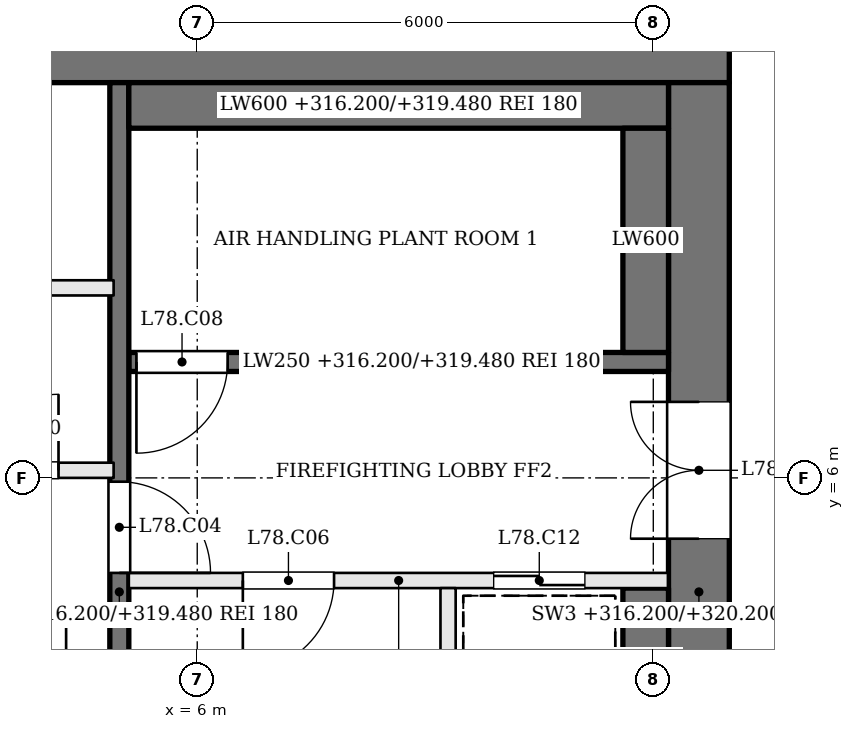
"""IFC4 building model, lengths in metres.
Left out: names, types, materials, properties, quantities, classifications, styles, units other than length and angle.
Written with IfcOpenShell. Run it as: python <this file> out.ifc"""

import sys

from ifc_helpers import new_model, si_unit, direction, frame, frame_2d, origin, place, context, subcontext, project, spatial, rectangle, extrude, element, fill, save


model = new_model("IFC4")
c1 = context("Model", 3, precision=1e-05, world=origin(), true_north=direction((0.0, 1.0)))
c2 = subcontext(c1, "Body", "Model", "MODEL_VIEW")
j1 = project(units=[si_unit("LENGTHUNIT", "METRE"), si_unit("PLANEANGLEUNIT", "RADIAN")], contexts=[c1])
p1 = place(None, origin())
s1 = spatial("IfcSite", under=j1, at=p1, CompositionType="ELEMENT")
p2 = place(p1, origin())
s2 = spatial("IfcBuilding", under=s1, at=p2, CompositionType="ELEMENT")
p3 = place(p2, frame((0.0, 0.0, 316.2)))
s3 = spatial("IfcBuildingStorey", under=s2, at=p3, CompositionType="ELEMENT", Elevation=316.2)
p4 = place(p3, frame((-13.0, 11.6, 0.0), z_axis=(0.0, 0.0, 1.0), x_axis=(1.0, 0.0, 0.0)))
e1 = element("IfcWall", 1, at=p4, inside=s3, PredefinedType="SHEAR", context=c2, shape_type="SweptSolid", body=[
    extrude(rectangle(XDim=26.0, YDim=0.8, at=frame_2d((13.0, 0.0))), origin(), (0.0, 0.0, 1.0), 4.0),
])
p5 = place(p4, frame((9.375, 0.0, 0.0)))
e2 = element("IfcOpeningElement", 2, at=p5, cuts=e1, PredefinedType="OPENING", context=c2, shape_type="SweptSolid", body=[
    extrude(rectangle(XDim=0.7, YDim=2.1, at=frame_2d((0.35, 1.05))), frame((0.0, 0.41, 0.0), z_axis=(0.0, -1.0, 0.0), x_axis=(1.0, 0.0, 0.0)), (0.0, 0.0, 1.0), 0.82),
])
p6 = place(p4, frame((12.375, 0.0, 0.0)))
e3 = element("IfcOpeningElement", 3, at=p6, cuts=e1, PredefinedType="OPENING", context=c2, shape_type="SweptSolid", body=[
    extrude(rectangle(XDim=1.2, YDim=2.1, at=frame_2d((0.6, 1.05))), frame((0.0, 0.41, 0.0), z_axis=(0.0, -1.0, 0.0), x_axis=(1.0, 0.0, 0.0)), (0.0, 0.0, 1.0), 0.82),
])
p7 = place(p4, frame((15.9, 0.0, 0.0)))
e4 = element("IfcOpeningElement", 4, at=p7, cuts=e1, PredefinedType="OPENING", context=c2, shape_type="SweptSolid", body=[
    extrude(rectangle(XDim=0.7, YDim=2.1, at=frame_2d((0.35, 1.05))), frame((0.0, 0.41, 0.0), z_axis=(0.0, -1.0, 0.0), x_axis=(1.0, 0.0, 0.0)), (0.0, 0.0, 1.0), 0.82),
])
p8 = place(p4, frame((6.7, 0.0, 0.0)))
e5 = element("IfcOpeningElement", 5, at=p8, cuts=e1, PredefinedType="OPENING", context=c2, shape_type="SweptSolid", body=[
    extrude(rectangle(XDim=0.9, YDim=2.1, at=frame_2d((0.45, 1.05))), frame((0.0, 0.41, 0.0), z_axis=(0.0, -1.0, 0.0), x_axis=(1.0, 0.0, 0.0)), (0.0, 0.0, 1.0), 0.82),
])
p9 = place(p3, frame((12.6, -2.2, 0.0), z_axis=(0.0, 0.0, 1.0), x_axis=(0.0, 1.0, 0.0)))
e6 = element("IfcWall", 6, at=p9, inside=s3, PredefinedType="SHEAR", context=c2, shape_type="SweptSolid", body=[
    extrude(rectangle(XDim=13.4, YDim=0.8, at=frame_2d((6.7, 0.0))), origin(), (0.0, 0.0, 1.0), 4.0),
])
p10 = place(p9, frame((7.4, 0.0, 0.0)))
e7 = element("IfcOpeningElement", 7, at=p10, cuts=e6, PredefinedType="OPENING", context=c2, shape_type="SweptSolid", body=[
    extrude(rectangle(XDim=1.8, YDim=2.1, at=frame_2d((0.9, 1.05))), frame((0.0, 0.41, 0.0), z_axis=(0.0, -1.0, 0.0), x_axis=(1.0, 0.0, 0.0)), (0.0, 0.0, 1.0), 0.82),
])
p11 = place(p3, frame((12.2, 7.525, 0.0), z_axis=(0.0, 0.0, 1.0), x_axis=(-1.0, 0.0, 0.0)))
e8 = element("IfcWall", 8, at=p11, inside=s3, PredefinedType="SOLIDWALL", context=c2, shape_type="SweptSolid", body=[
    extrude(rectangle(XDim=7.1, YDim=0.25, at=frame_2d((3.55, 0.0))), origin(), (0.0, 0.0, 1.0), 3.28),
])
p12 = place(p11, frame((5.8, 0.0, 0.0)))
e9 = element("IfcOpeningElement", 9, at=p12, cuts=e8, PredefinedType="OPENING", context=c2, shape_type="SweptSolid", body=[
    extrude(rectangle(XDim=1.2, YDim=2.1, at=frame_2d((0.6, 1.05))), frame((0.0, 0.135, 0.0), z_axis=(0.0, -1.0, 0.0), x_axis=(1.0, 0.0, 0.0)), (0.0, 0.0, 1.0), 0.27),
])
p13 = place(p3, frame((12.2, 4.65, 0.0), z_axis=(0.0, 0.0, 1.0), x_axis=(-1.0, 0.0, 0.0)))
e10 = element("IfcWall", 10, at=p13, inside=s3, PredefinedType="SOLIDWALL", context=c2, shape_type="SweptSolid", body=[
    extrude(rectangle(XDim=7.1, YDim=0.2, at=frame_2d((3.55, 0.0))), origin(), (0.0, 0.0, 1.0), 3.28),
])
p14 = place(p13, frame((4.4, 0.0, 0.0)))
e11 = element("IfcOpeningElement", 11, at=p14, cuts=e10, PredefinedType="OPENING", context=c2, shape_type="SweptSolid", body=[
    extrude(rectangle(XDim=1.2, YDim=2.1, at=frame_2d((0.6, 1.05))), frame((0.0, 0.11, 0.0), z_axis=(0.0, -1.0, 0.0), x_axis=(1.0, 0.0, 0.0)), (0.0, 0.0, 1.0), 0.22),
])
p15 = place(p13, frame((1.1, 0.0, 0.0)))
e12 = element("IfcOpeningElement", 12, at=p15, cuts=e10, PredefinedType="OPENING", context=c2, shape_type="SweptSolid", body=[
    extrude(rectangle(XDim=1.2, YDim=2.1, at=frame_2d((0.6, 1.05))), frame((0.0, 0.11, 0.0), z_axis=(0.0, -1.0, 0.0), x_axis=(1.0, 0.0, 0.0)), (0.0, 0.0, 1.0), 0.22),
])
p16 = place(p3, frame((9.3, 4.55, 0.0), z_axis=(0.0, 0.0, 1.0), x_axis=(0.0, -1.0, 0.0)))
e13 = element("IfcWall", 13, at=p16, inside=s3, PredefinedType="SOLIDWALL", context=c2, shape_type="SweptSolid", body=[
    extrude(rectangle(XDim=3.0, YDim=0.2, at=frame_2d((1.5, 0.0))), origin(), (0.0, 0.0, 1.0), 3.28),
])
p17 = place(p3, frame((4.975, 11.2, 0.0), z_axis=(0.0, 0.0, 1.0), x_axis=(0.0, -1.0, 0.0)))
e14 = element("IfcWall", 14, at=p17, inside=s3, PredefinedType="SOLIDWALL", context=c2, shape_type="SweptSolid", body=[
    extrude(rectangle(XDim=13.4, YDim=0.25, at=frame_2d((6.7, 0.0))), origin(), (0.0, 0.0, 1.0), 3.28),
])
p18 = place(p17, frame((5.25, 0.0, 0.0)))
e15 = element("IfcOpeningElement", 15, at=p18, cuts=e14, PredefinedType="OPENING", context=c2, shape_type="SweptSolid", body=[
    extrude(rectangle(XDim=1.2, YDim=2.1, at=frame_2d((0.6, 1.05))), frame((0.0, 0.135, 0.0), z_axis=(0.0, -1.0, 0.0), x_axis=(1.0, 0.0, 0.0)), (0.0, 0.0, 1.0), 0.27),
])
p19 = place(p3, frame((12.2, 10.9, 0.0), z_axis=(0.0, 0.0, 1.0), x_axis=(-1.0, 0.0, 0.0)))
e16 = element("IfcWall", 16, at=p19, inside=s3, PredefinedType="SOLIDWALL", context=c2, shape_type="SweptSolid", body=[
    extrude(rectangle(XDim=7.1, YDim=0.6, at=frame_2d((3.55, 0.0))), origin(), (0.0, 0.0, 1.0), 3.28),
])
p20 = place(p3, frame((11.9, 10.6, 0.0), z_axis=(0.0, 0.0, 1.0), x_axis=(0.0, -1.0, 0.0)))
e17 = element("IfcWall", 17, at=p20, inside=s3, PredefinedType="SOLIDWALL", context=c2, shape_type="SweptSolid", body=[
    extrude(rectangle(XDim=2.95, YDim=0.6, at=frame_2d((1.475, 0.0))), origin(), (0.0, 0.0, 1.0), 3.28),
])
p21 = place(p3, frame((11.9, 4.55, 0.0), z_axis=(0.0, 0.0, 1.0), x_axis=(0.0, -1.0, 0.0)))
e18 = element("IfcWall", 18, at=p21, inside=s3, PredefinedType="SOLIDWALL", context=c2, shape_type="SweptSolid", body=[
    extrude(rectangle(XDim=3.0, YDim=0.6, at=frame_2d((1.5, 0.0))), origin(), (0.0, 0.0, 1.0), 3.28),
])
p22 = place(p3, frame((-4.9, 6.1, 0.0), z_axis=(0.0, 0.0, 1.0), x_axis=(1.0, 0.0, 0.0)))
e19 = element("IfcWall", 19, at=p22, inside=s3, PredefinedType="SOLIDWALL", context=c2, shape_type="SweptSolid", body=[
    extrude(rectangle(XDim=9.8, YDim=0.2, at=frame_2d((4.9, 0.0))), origin(), (0.0, 0.0, 1.0), 3.28),
])
p23 = place(p22, frame((0.725, 0.0, 0.0)))
e20 = element("IfcOpeningElement", 20, at=p23, cuts=e19, PredefinedType="OPENING", context=c2, shape_type="SweptSolid", body=[
    extrude(rectangle(XDim=1.0, YDim=2.1, at=frame_2d((0.5, 1.05))), frame((0.0, 0.11, 0.0), z_axis=(0.0, -1.0, 0.0), x_axis=(1.0, 0.0, 0.0)), (0.0, 0.0, 1.0), 0.22),
])
p24 = place(p22, frame((3.175, 0.0, 0.0)))
e21 = element("IfcOpeningElement", 21, at=p24, cuts=e19, PredefinedType="OPENING", context=c2, shape_type="SweptSolid", body=[
    extrude(rectangle(XDim=1.0, YDim=2.1, at=frame_2d((0.5, 1.05))), frame((0.0, 0.11, 0.0), z_axis=(0.0, -1.0, 0.0), x_axis=(1.0, 0.0, 0.0)), (0.0, 0.0, 1.0), 0.22),
])
p25 = place(p22, frame((5.625, 0.0, 0.0)))
e22 = element("IfcOpeningElement", 22, at=p25, cuts=e19, PredefinedType="OPENING", context=c2, shape_type="SweptSolid", body=[
    extrude(rectangle(XDim=1.0, YDim=2.1, at=frame_2d((0.5, 1.05))), frame((0.0, 0.11, 0.0), z_axis=(0.0, -1.0, 0.0), x_axis=(1.0, 0.0, 0.0)), (0.0, 0.0, 1.0), 0.22),
])
p26 = place(p22, frame((8.075, 0.0, 0.0)))
e23 = element("IfcOpeningElement", 23, at=p26, cuts=e19, PredefinedType="OPENING", context=c2, shape_type="SweptSolid", body=[
    extrude(rectangle(XDim=1.0, YDim=2.1, at=frame_2d((0.5, 1.05))), frame((0.0, 0.11, 0.0), z_axis=(0.0, -1.0, 0.0), x_axis=(1.0, 0.0, 0.0)), (0.0, 0.0, 1.0), 0.22),
])
p27 = place(p3, frame((-4.9, 8.5, 0.0), z_axis=(0.0, 0.0, 1.0), x_axis=(1.0, 0.0, 0.0)))
e24 = element("IfcWall", 24, at=p27, inside=s3, PredefinedType="SOLIDWALL", context=c2, shape_type="SweptSolid", body=[
    extrude(rectangle(XDim=9.8, YDim=0.2, at=frame_2d((4.9, 0.0))), origin(), (0.0, 0.0, 1.0), 3.28),
])
p28 = place(p10, origin())
e25 = element("IfcDoor", 25, at=p28, inside=s3, OperationType="DOUBLE_DOOR_SINGLE_SWING", PredefinedType="DOOR", context=c2, shape_type="SweptSolid", body=[
    extrude(rectangle(XDim=1.8, YDim=2.1, at=frame_2d((0.9, 1.05))), frame((0.0, 0.025, 0.0), z_axis=(0.0, -1.0, 0.0), x_axis=(1.0, 0.0, 0.0)), (0.0, 0.0, 1.0), 0.05),
])
fill(e7, e25)
p29 = place(p18, origin())
e26 = element("IfcDoor", 26, at=p29, inside=s3, OperationType="SINGLE_SWING_RIGHT", PredefinedType="DOOR", context=c2, shape_type="SweptSolid", body=[
    extrude(rectangle(XDim=1.2, YDim=2.1, at=frame_2d((0.6, 1.05))), frame((0.0, 0.025, 0.0), z_axis=(0.0, -1.0, 0.0), x_axis=(1.0, 0.0, 0.0)), (0.0, 0.0, 1.0), 0.05),
])
fill(e15, e26)
p30 = place(p14, origin())
e27 = element("IfcDoor", 27, at=p30, inside=s3, OperationType="SINGLE_SWING_RIGHT", PredefinedType="DOOR", context=c2, shape_type="SweptSolid", body=[
    extrude(rectangle(XDim=1.2, YDim=2.1, at=frame_2d((0.6, 1.05))), frame((0.0, 0.025, 0.0), z_axis=(0.0, -1.0, 0.0), x_axis=(1.0, 0.0, 0.0)), (0.0, 0.0, 1.0), 0.05),
])
fill(e11, e27)
p31 = place(p12, origin())
e28 = element("IfcDoor", 28, at=p31, inside=s3, OperationType="SINGLE_SWING_RIGHT", PredefinedType="DOOR", context=c2, shape_type="SweptSolid", body=[
    extrude(rectangle(XDim=1.2, YDim=2.1, at=frame_2d((0.6, 1.05))), frame((0.0, 0.025, 0.0), z_axis=(0.0, -1.0, 0.0), x_axis=(1.0, 0.0, 0.0)), (0.0, 0.0, 1.0), 0.05),
])
fill(e9, e28)
p32 = place(p15, origin())
e29 = element("IfcDoor", 29, at=p32, inside=s3, OperationType="SLIDING_TO_RIGHT", PredefinedType="DOOR", context=c2, shape_type="SweptSolid", body=[
    extrude(rectangle(XDim=1.2, YDim=2.1, at=frame_2d((0.6, 1.05))), frame((0.0, 0.025, 0.0), z_axis=(0.0, -1.0, 0.0), x_axis=(1.0, 0.0, 0.0)), (0.0, 0.0, 1.0), 0.05),
])
fill(e12, e29)
p33 = place(p26, origin())
e30 = element("IfcDoor", 30, at=p33, inside=s3, OperationType="SINGLE_SWING_RIGHT", PredefinedType="DOOR", context=c2, shape_type="SweptSolid", body=[
    extrude(rectangle(XDim=1.0, YDim=2.1, at=frame_2d((0.5, 1.05))), frame((0.0, 0.025, 0.0), z_axis=(0.0, -1.0, 0.0), x_axis=(1.0, 0.0, 0.0)), (0.0, 0.0, 1.0), 0.05),
])
fill(e23, e30)
save(model, sys.argv[1])
